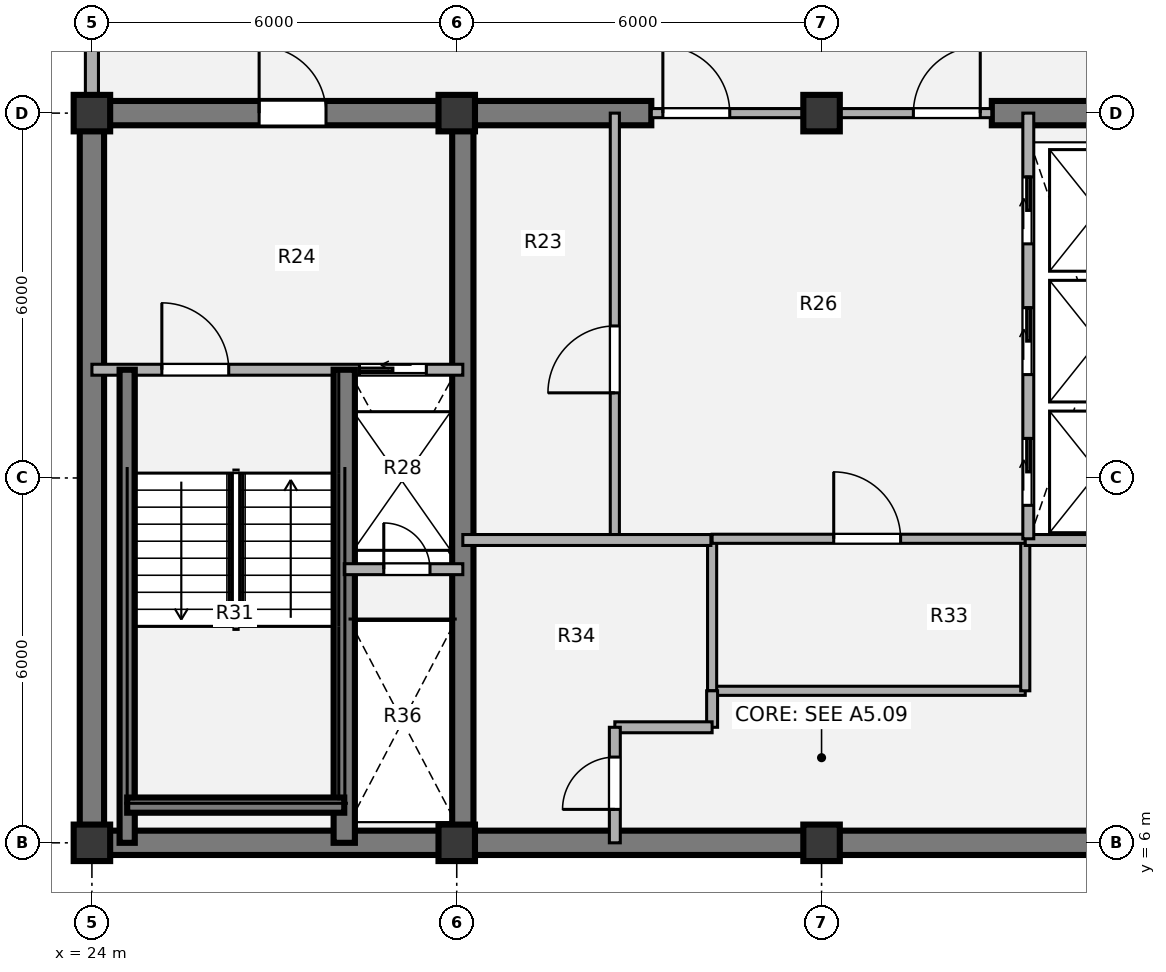
"""IFC4 building model, lengths in metres.
Left out: names, types, materials, properties, quantities, classifications, styles, units other than length and angle.
Written with IfcOpenShell. Run it as: python <this file> out.ifc"""

import sys

from ifc_helpers import new_model, si_unit, direction, frame, frame_2d, origin, origin_2d, place, context, subcontext, project, spatial, rectangle, extrude, source, transform, mapped, element, fill, save


model = new_model("IFC4")
c1 = context("Model", 3, precision=1e-05, world=origin(), true_north=direction((0.0, 1.0)))
c2 = subcontext(c1, "Body", "Model", "MODEL_VIEW")
j1 = project(units=[si_unit("LENGTHUNIT", "METRE"), si_unit("PLANEANGLEUNIT", "RADIAN")], contexts=[c1])
p1 = place(None, origin())
s1 = spatial("IfcSite", under=j1, at=p1, CompositionType="ELEMENT")
p2 = place(p1, origin())
s2 = spatial("IfcBuilding", under=s1, at=p2, CompositionType="ELEMENT")
p3 = place(p2, frame((0.0, 0.0, 275.94)))
s3 = spatial("IfcBuildingStorey", under=s2, at=p3, CompositionType="ELEMENT", Elevation=275.94)
m1 = source(origin(), c2, "Body", "SweptSolid", [
    extrude(rectangle(XDim=0.6, YDim=0.6, at=origin_2d()), origin(), (0.0, 0.0, 1.0), 3.78),
])
for number, where, z_axis, x_axis in (
    (1, (24.0, 6.0, 0.0), (0.0, 0.0, 1.0), (1.0, 0.0, 0.0)),
    (2, (30.0, 6.0, 0.0), (0.0, 0.0, 1.0), (1.0, 0.0, 0.0)),
    (3, (36.0, 6.0, 0.0), (0.0, 0.0, 1.0), (1.0, 0.0, 0.0)),
    (4, (24.0, 18.0, 0.0), (0.0, 0.0, 1.0), (1.0, 0.0, 0.0)),
    (5, (30.0, 18.0, 0.0), (0.0, 0.0, 1.0), (1.0, 0.0, 0.0)),
    (6, (36.0, 18.0, 0.0), (0.0, 0.0, 1.0), (1.0, 0.0, 0.0)),
):
    element("IfcColumn", number, at=place(p3, frame(where, z_axis=z_axis, x_axis=x_axis)), inside=s3, PredefinedType="COLUMN", context=c2, shape_type="MappedRepresentation", body=[
        mapped(m1, transform((0.0, 0.0, 0.0), x_axis=(1.0, 0.0, 0.0), y_axis=(0.0, 1.0, 0.0), z_axis=(0.0, 0.0, 1.0), scale=1.0)),
    ])
p4 = place(p3, frame((48.2, 6.0, 0.0), z_axis=(0.0, 0.0, 1.0), x_axis=(-1.0, 0.0, 0.0)))
e7 = element("IfcWall", 7, at=p4, inside=s3, PredefinedType="SHEAR", context=c2, shape_type="SweptSolid", body=[
    extrude(rectangle(XDim=24.4, YDim=0.4, at=frame_2d((12.2, 0.0))), origin(), (0.0, 0.0, 1.0), 3.78),
])
p5 = place(p3, frame((24.0, 6.0, 0.0), z_axis=(0.0, 0.0, 1.0), x_axis=(0.0, 1.0, 0.0)))
e8 = element("IfcWall", 8, at=p5, inside=s3, PredefinedType="SHEAR", context=c2, shape_type="SweptSolid", body=[
    extrude(rectangle(XDim=12.0, YDim=0.4, at=frame_2d((6.0, 0.0))), origin(), (0.0, 0.0, 1.0), 3.78),
])
p6 = place(p3, frame((23.8, 18.0, 0.0), z_axis=(0.0, 0.0, 1.0), x_axis=(1.0, 0.0, 0.0)))
e9 = element("IfcWall", 9, at=p6, inside=s3, PredefinedType="SHEAR", context=c2, shape_type="SweptSolid", body=[
    extrude(rectangle(XDim=9.4, YDim=0.4, at=frame_2d((4.7, 0.0))), origin(), (0.0, 0.0, 1.0), 3.78),
])
p7 = place(p6, frame((2.95, 0.0, 0.0)))
e10 = element("IfcOpeningElement", 10, at=p7, cuts=e9, PredefinedType="OPENING", context=c2, shape_type="SweptSolid", body=[
    extrude(rectangle(XDim=1.1, YDim=2.1, at=origin_2d()), frame((0.55, 0.21, 1.05), z_axis=(0.0, -1.0, 0.0), x_axis=(1.0, 0.0, 0.0)), (0.0, 0.0, 1.0), 0.42),
])
p8 = place(p3, frame((38.8, 18.0, 0.0), z_axis=(0.0, 0.0, 1.0), x_axis=(1.0, 0.0, 0.0)))
e11 = element("IfcWall", 11, at=p8, inside=s3, PredefinedType="SHEAR", context=c2, shape_type="SweptSolid", body=[
    extrude(rectangle(XDim=9.4, YDim=0.4, at=frame_2d((4.7, 0.0))), origin(), (0.0, 0.0, 1.0), 3.78),
])
p9 = place(p8, frame((5.45, 0.0, 0.0)))
e12 = element("IfcOpeningElement", 12, at=p9, cuts=e11, PredefinedType="OPENING", context=c2, shape_type="SweptSolid", body=[
    extrude(rectangle(XDim=1.1, YDim=2.1, at=origin_2d()), frame((0.55, 0.21, 1.05), z_axis=(0.0, -1.0, 0.0), x_axis=(1.0, 0.0, 0.0)), (0.0, 0.0, 1.0), 0.42),
])
p10 = place(p3, frame((30.1, 6.0, 0.0), z_axis=(0.0, 0.0, 1.0), x_axis=(0.0, 1.0, 0.0)))
e13 = element("IfcWall", 13, at=p10, inside=s3, PredefinedType="SHEAR", context=c2, shape_type="SweptSolid", body=[
    extrude(rectangle(XDim=12.0, YDim=0.35, at=frame_2d((6.0, 0.0))), origin(), (0.0, 0.0, 1.0), 3.78),
])
p11 = place(p3, frame((24.0, 18.28, 0.0), z_axis=(0.0, 0.0, 1.0), x_axis=(0.0, 1.0, 0.0)))
e14 = element("IfcWall", 14, at=p11, inside=s3, PredefinedType="SOLIDWALL", context=c2, shape_type="SweptSolid", body=[
    extrude(rectangle(XDim=2.77, YDim=0.215, at=frame_2d((1.385, 0.0))), origin(), (0.0, 0.0, 1.0), 2.718),
])
p12 = place(p3, frame((32.6, 11.0, 0.0), z_axis=(0.0, 0.0, 1.0), x_axis=(0.0, 1.0, 0.0)))
e15 = element("IfcWall", 15, at=p12, inside=s3, PredefinedType="PARTITIONING", context=c2, shape_type="SweptSolid", body=[
    extrude(rectangle(XDim=7.0, YDim=0.15, at=frame_2d((3.5, 0.0))), origin(), (0.0, 0.0, 1.0), 3.5),
])
p13 = place(p12, frame((2.4, 0.0, 0.0)))
e16 = element("IfcOpeningElement", 16, at=p13, cuts=e15, PredefinedType="OPENING", context=c2, shape_type="SweptSolid", body=[
    extrude(rectangle(XDim=1.1, YDim=2.1, at=origin_2d()), frame((0.55, 0.085, 1.05), z_axis=(0.0, -1.0, 0.0), x_axis=(1.0, 0.0, 0.0)), (0.0, 0.0, 1.0), 0.17),
])
p14 = place(p3, frame((34.2, 8.5, 0.0), z_axis=(0.0, 0.0, 1.0), x_axis=(1.0, 0.0, 0.0)))
e17 = element("IfcWall", 17, at=p14, inside=s3, PredefinedType="PARTITIONING", context=c2, shape_type="SweptSolid", body=[
    extrude(rectangle(XDim=5.15, YDim=0.15, at=frame_2d((2.575, 0.0))), origin(), (0.0, 0.0, 1.0), 3.5),
])
for number, where, z_axis, x_axis in (
    (18, (34.2, 8.5, 0.0), (0.0, 0.0, 1.0), (0.0, 1.0, 0.0)),
    (19, (39.35, 8.5, 0.0), (0.0, 0.0, 1.0), (0.0, 1.0, 0.0)),
):
    element("IfcWall", number, at=place(p3, frame(where, z_axis=z_axis, x_axis=x_axis)), inside=s3, PredefinedType="PARTITIONING", context=c2, shape_type="SweptSolid", body=[
        extrude(rectangle(XDim=2.5, YDim=0.15, at=frame_2d((1.25, 0.0))), origin(), (0.0, 0.0, 1.0), 3.5),
    ])
p15 = place(p3, frame((34.2, 11.0, 0.0), z_axis=(0.0, 0.0, 1.0), x_axis=(1.0, 0.0, 0.0)))
e20 = element("IfcWall", 20, at=p15, inside=s3, PredefinedType="PARTITIONING", context=c2, shape_type="SweptSolid", body=[
    extrude(rectangle(XDim=5.15, YDim=0.15, at=frame_2d((2.575, 0.0))), origin(), (0.0, 0.0, 1.0), 3.5),
])
p16 = place(p15, frame((2.0, 0.0, 0.0)))
e21 = element("IfcOpeningElement", 21, at=p16, cuts=e20, PredefinedType="OPENING", context=c2, shape_type="SweptSolid", body=[
    extrude(rectangle(XDim=1.1, YDim=2.1, at=origin_2d()), frame((0.55, 0.085, 1.05), z_axis=(0.0, -1.0, 0.0), x_axis=(1.0, 0.0, 0.0)), (0.0, 0.0, 1.0), 0.17),
])
p17 = place(p3, frame((30.1, 10.98, 0.0), z_axis=(0.0, 0.0, 1.0), x_axis=(1.0, 0.0, 0.0)))
e22 = element("IfcWall", 22, at=p17, inside=s3, PredefinedType="PARTITIONING", context=c2, shape_type="SweptSolid", body=[
    extrude(rectangle(XDim=4.08, YDim=0.18, at=frame_2d((2.04, 0.0))), origin(), (0.0, 0.0, 1.0), 3.5),
])
p18 = place(p3, frame((34.2, 7.9, 0.0), z_axis=(0.0, 0.0, 1.0), x_axis=(0.0, 1.0, 0.0)))
e23 = element("IfcWall", 23, at=p18, inside=s3, PredefinedType="PARTITIONING", context=c2, shape_type="SweptSolid", body=[
    extrude(rectangle(XDim=0.6, YDim=0.18, at=frame_2d((0.3, 0.0))), origin(), (0.0, 0.0, 1.0), 3.5),
])
p19 = place(p3, frame((32.6, 7.9, 0.0), z_axis=(0.0, 0.0, 1.0), x_axis=(1.0, 0.0, 0.0)))
e24 = element("IfcWall", 24, at=p19, inside=s3, PredefinedType="PARTITIONING", context=c2, shape_type="SweptSolid", body=[
    extrude(rectangle(XDim=1.6, YDim=0.18, at=frame_2d((0.8, 0.0))), origin(), (0.0, 0.0, 1.0), 3.5),
])
p20 = place(p3, frame((32.6, 6.0, 0.0), z_axis=(0.0, 0.0, 1.0), x_axis=(0.0, 1.0, 0.0)))
e25 = element("IfcWall", 25, at=p20, inside=s3, PredefinedType="PARTITIONING", context=c2, shape_type="SweptSolid", body=[
    extrude(rectangle(XDim=1.9, YDim=0.18, at=frame_2d((0.95, 0.0))), origin(), (0.0, 0.0, 1.0), 3.5),
])
p21 = place(p20, frame((0.55, 0.0, 0.0)))
e26 = element("IfcOpeningElement", 26, at=p21, cuts=e25, PredefinedType="OPENING", context=c2, shape_type="SweptSolid", body=[
    extrude(rectangle(XDim=0.86, YDim=2.1, at=origin_2d()), frame((0.43, 0.1, 1.05), z_axis=(0.0, -1.0, 0.0), x_axis=(1.0, 0.0, 0.0)), (0.0, 0.0, 1.0), 0.2),
])
p22 = place(p3, frame((39.35, 10.98, 0.0), z_axis=(0.0, 0.0, 1.0), x_axis=(1.0, 0.0, 0.0)))
e27 = element("IfcWall", 27, at=p22, inside=s3, PredefinedType="PARTITIONING", context=c2, shape_type="SweptSolid", body=[
    extrude(rectangle(XDim=2.55, YDim=0.18, at=frame_2d((1.275, 0.0))), origin(), (0.0, 0.0, 1.0), 3.5),
])
p23 = place(p3, frame((33.2, 18.0, 0.0), z_axis=(0.0, 0.0, 1.0), x_axis=(1.0, 0.0, 0.0)))
e28 = element("IfcWall", 28, at=p23, inside=s3, PredefinedType="PARTITIONING", context=c2, shape_type="SweptSolid", body=[
    extrude(rectangle(XDim=5.6, YDim=0.15, at=frame_2d((2.8, 0.0))), origin(), (0.0, 0.0, 1.0), 2.515),
])
p24 = place(p23, frame((0.19, 0.0, 0.0)))
e29 = element("IfcOpeningElement", 29, at=p24, cuts=e28, PredefinedType="OPENING", context=c2, shape_type="SweptSolid", body=[
    extrude(rectangle(XDim=1.1, YDim=2.1, at=origin_2d()), frame((0.55, 0.085, 1.05), z_axis=(0.0, -1.0, 0.0), x_axis=(1.0, 0.0, 0.0)), (0.0, 0.0, 1.0), 0.17),
])
p25 = place(p23, frame((4.31, 0.0, 0.0)))
e30 = element("IfcOpeningElement", 30, at=p25, cuts=e28, PredefinedType="OPENING", context=c2, shape_type="SweptSolid", body=[
    extrude(rectangle(XDim=1.1, YDim=2.1, at=origin_2d()), frame((0.55, 0.085, 1.05), z_axis=(0.0, -1.0, 0.0), x_axis=(1.0, 0.0, 0.0)), (0.0, 0.0, 1.0), 0.17),
])
p26 = place(p3, frame((24.0, 13.78, 0.0), z_axis=(0.0, 0.0, 1.0), x_axis=(1.0, 0.0, 0.0)))
e31 = element("IfcWall", 31, at=p26, inside=s3, PredefinedType="PARTITIONING", context=c2, shape_type="SweptSolid", body=[
    extrude(rectangle(XDim=6.1, YDim=0.18, at=frame_2d((3.05, 0.0))), origin(), (0.0, 0.0, 1.0), 3.5),
])
p27 = place(p26, frame((1.15, 0.0, 0.0)))
e32 = element("IfcOpeningElement", 32, at=p27, cuts=e31, PredefinedType="OPENING", context=c2, shape_type="SweptSolid", body=[
    extrude(rectangle(XDim=1.1, YDim=2.1, at=origin_2d()), frame((0.55, 0.1, 1.05), z_axis=(0.0, -1.0, 0.0), x_axis=(1.0, 0.0, 0.0)), (0.0, 0.0, 1.0), 0.2),
])
p28 = place(p26, frame((4.4, 0.0, 0.0)))
e33 = element("IfcOpeningElement", 33, at=p28, cuts=e31, PredefinedType="OPENING", context=c2, shape_type="SweptSolid", body=[
    extrude(rectangle(XDim=1.1, YDim=2.1, at=origin_2d()), frame((0.55, 0.1, 1.05), z_axis=(0.0, -1.0, 0.0), x_axis=(1.0, 0.0, 0.0)), (0.0, 0.0, 1.0), 0.2),
])
p29 = place(p3, frame((28.15, 6.0, 0.0), z_axis=(0.0, 0.0, 1.0), x_axis=(0.0, 1.0, 0.0)))
e34 = element("IfcWall", 34, at=p29, inside=s3, PredefinedType="SHEAR", context=c2, shape_type="SweptSolid", body=[
    extrude(rectangle(XDim=7.78, YDim=0.35, at=frame_2d((3.89, 0.0))), origin(), (0.0, 0.0, 1.0), 3.85),
])
p30 = place(p3, frame((24.58, 6.0, 0.0), z_axis=(0.0, 0.0, 1.0), x_axis=(0.0, 1.0, 0.0)))
e35 = element("IfcWall", 35, at=p30, inside=s3, PredefinedType="SHEAR", context=c2, shape_type="SweptSolid", body=[
    extrude(rectangle(XDim=7.78, YDim=0.25, at=frame_2d((3.89, 0.0))), origin(), (0.0, 0.0, 1.0), 3.85),
])
p31 = place(p3, frame((24.58, 6.62, 0.0), z_axis=(0.0, 0.0, 1.0), x_axis=(1.0, 0.0, 0.0)))
e36 = element("IfcWall", 36, at=p31, inside=s3, PredefinedType="SHEAR", context=c2, shape_type="SweptSolid", body=[
    extrude(rectangle(XDim=3.57, YDim=0.25, at=frame_2d((1.785, 0.0))), origin(), (0.0, 0.0, 1.0), 3.85),
])
p32 = place(p3, frame((28.15, 10.5, 0.0), z_axis=(0.0, 0.0, 1.0), x_axis=(1.0, 0.0, 0.0)))
e37 = element("IfcWall", 37, at=p32, inside=s3, PredefinedType="PARTITIONING", context=c2, shape_type="SweptSolid", body=[
    extrude(rectangle(XDim=1.95, YDim=0.18, at=frame_2d((0.975, 0.0))), origin(), (0.0, 0.0, 1.0), 3.5),
])
p33 = place(p32, frame((0.65, 0.0, 0.0)))
e38 = element("IfcOpeningElement", 38, at=p33, cuts=e37, PredefinedType="OPENING", context=c2, shape_type="SweptSolid", body=[
    extrude(rectangle(XDim=0.76, YDim=2.05, at=origin_2d()), frame((0.38, 0.1, 1.025), z_axis=(0.0, -1.0, 0.0), x_axis=(1.0, 0.0, 0.0)), (0.0, 0.0, 1.0), 0.2),
])
p34 = place(p3, frame((39.4, 11.0, 0.0), z_axis=(0.0, 0.0, 1.0), x_axis=(0.0, 1.0, 0.0)))
e39 = element("IfcWall", 39, at=p34, inside=s3, PredefinedType="PARTITIONING", context=c2, shape_type="SweptSolid", body=[
    extrude(rectangle(XDim=7.0, YDim=0.18, at=frame_2d((3.5, 0.0))), origin(), (0.0, 0.0, 1.0), 3.5),
])
p35 = place(p34, frame((0.55, 0.0, 0.0)))
e40 = element("IfcOpeningElement", 40, at=p35, cuts=e39, PredefinedType="OPENING", context=c2, shape_type="SweptSolid", body=[
    extrude(rectangle(XDim=1.1, YDim=2.1, at=origin_2d()), frame((0.55, 0.1, 1.05), z_axis=(0.0, -1.0, 0.0), x_axis=(1.0, 0.0, 0.0)), (0.0, 0.0, 1.0), 0.2),
])
p36 = place(p34, frame((2.7, 0.0, 0.0)))
e41 = element("IfcOpeningElement", 41, at=p36, cuts=e39, PredefinedType="OPENING", context=c2, shape_type="SweptSolid", body=[
    extrude(rectangle(XDim=1.1, YDim=2.1, at=origin_2d()), frame((0.55, 0.1, 1.05), z_axis=(0.0, -1.0, 0.0), x_axis=(1.0, 0.0, 0.0)), (0.0, 0.0, 1.0), 0.2),
])
p37 = place(p34, frame((4.85, 0.0, 0.0)))
e42 = element("IfcOpeningElement", 42, at=p37, cuts=e39, PredefinedType="OPENING", context=c2, shape_type="SweptSolid", body=[
    extrude(rectangle(XDim=1.1, YDim=2.1, at=origin_2d()), frame((0.55, 0.1, 1.05), z_axis=(0.0, -1.0, 0.0), x_axis=(1.0, 0.0, 0.0)), (0.0, 0.0, 1.0), 0.2),
])
m2 = source(origin(), c2, "Body", "SweptSolid", [
    extrude(rectangle(XDim=1.1, YDim=2.1, at=origin_2d()), frame((0.55, 0.025, 1.05), z_axis=(0.0, -1.0, 0.0), x_axis=(1.0, 0.0, 0.0)), (0.0, 0.0, 1.0), 0.05),
])
p38 = place(p13, origin())
e43 = element("IfcDoor", 43, at=p38, inside=s3, OperationType="SINGLE_SWING_LEFT", PredefinedType="DOOR", context=c2, shape_type="MappedRepresentation", body=[
    mapped(m2, transform((0.0, 0.0, 0.0), x_axis=(1.0, 0.0, 0.0), y_axis=(0.0, 1.0, 0.0), z_axis=(0.0, 0.0, 1.0), scale=1.0)),
])
fill(e16, e43)
p39 = place(p16, origin())
e44 = element("IfcDoor", 44, at=p39, inside=s3, OperationType="SINGLE_SWING_LEFT", PredefinedType="DOOR", context=c2, shape_type="MappedRepresentation", body=[
    mapped(m2, transform((0.0, 0.0, 0.0), x_axis=(1.0, 0.0, 0.0), y_axis=(0.0, 1.0, 0.0), z_axis=(0.0, 0.0, 1.0), scale=1.0)),
])
fill(e21, e44)
m3 = source(origin(), c2, "Body", "SweptSolid", [
    extrude(rectangle(XDim=0.86, YDim=2.1, at=origin_2d()), frame((0.43, 0.025, 1.05), z_axis=(0.0, -1.0, 0.0), x_axis=(1.0, 0.0, 0.0)), (0.0, 0.0, 1.0), 0.05),
])
p40 = place(p21, origin())
e45 = element("IfcDoor", 45, at=p40, inside=s3, OperationType="SINGLE_SWING_LEFT", PredefinedType="DOOR", context=c2, shape_type="MappedRepresentation", body=[
    mapped(m3, transform((0.0, 0.0, 0.0), x_axis=(1.0, 0.0, 0.0), y_axis=(0.0, 1.0, 0.0), z_axis=(0.0, 0.0, 1.0), scale=1.0)),
])
fill(e26, e45)
m4 = source(origin(), c2, "Body", "SweptSolid", [
    extrude(rectangle(XDim=1.1, YDim=2.1, at=origin_2d()), frame((0.55, 0.025, 1.05), z_axis=(0.0, -1.0, 0.0), x_axis=(1.0, 0.0, 0.0)), (0.0, 0.0, 1.0), 0.05),
])
p41 = place(p24, origin())
e46 = element("IfcDoor", 46, at=p41, inside=s3, OperationType="SINGLE_SWING_LEFT", PredefinedType="DOOR", context=c2, shape_type="MappedRepresentation", body=[
    mapped(m4, transform((0.0, 0.0, 0.0), x_axis=(1.0, 0.0, 0.0), y_axis=(0.0, 1.0, 0.0), z_axis=(0.0, 0.0, 1.0), scale=1.0)),
])
fill(e29, e46)
p42 = place(p25, origin())
e47 = element("IfcDoor", 47, at=p42, inside=s3, OperationType="SINGLE_SWING_RIGHT", PredefinedType="DOOR", context=c2, shape_type="MappedRepresentation", body=[
    mapped(m4, transform((0.0, 0.0, 0.0), x_axis=(1.0, 0.0, 0.0), y_axis=(0.0, 1.0, 0.0), z_axis=(0.0, 0.0, 1.0), scale=1.0)),
])
fill(e30, e47)
m5 = source(origin(), c2, "Body", "SweptSolid", [
    extrude(rectangle(XDim=1.1, YDim=2.1, at=origin_2d()), frame((0.55, 0.025, 1.05), z_axis=(0.0, -1.0, 0.0), x_axis=(1.0, 0.0, 0.0)), (0.0, 0.0, 1.0), 0.05),
])
p43 = place(p27, origin())
e48 = element("IfcDoor", 48, at=p43, inside=s3, OperationType="SINGLE_SWING_LEFT", PredefinedType="DOOR", context=c2, shape_type="MappedRepresentation", body=[
    mapped(m5, transform((0.0, 0.0, 0.0), x_axis=(1.0, 0.0, 0.0), y_axis=(0.0, 1.0, 0.0), z_axis=(0.0, 0.0, 1.0), scale=1.0)),
])
fill(e32, e48)
m6 = source(origin(), c2, "Body", "SweptSolid", [
    extrude(rectangle(XDim=1.1, YDim=2.1, at=origin_2d()), frame((0.55, 0.025, 1.05), z_axis=(0.0, -1.0, 0.0), x_axis=(1.0, 0.0, 0.0)), (0.0, 0.0, 1.0), 0.05),
])
p44 = place(p28, origin())
e49 = element("IfcDoor", 49, at=p44, inside=s3, OperationType="SLIDING_TO_LEFT", PredefinedType="DOOR", context=c2, shape_type="MappedRepresentation", body=[
    mapped(m6, transform((0.0, 0.0, 0.0), x_axis=(1.0, 0.0, 0.0), y_axis=(0.0, 1.0, 0.0), z_axis=(0.0, 0.0, 1.0), scale=1.0)),
])
fill(e33, e49)
m7 = source(origin(), c2, "Body", "SweptSolid", [
    extrude(rectangle(XDim=0.76, YDim=2.05, at=origin_2d()), frame((0.38, 0.025, 1.025), z_axis=(0.0, -1.0, 0.0), x_axis=(1.0, 0.0, 0.0)), (0.0, 0.0, 1.0), 0.05),
])
p45 = place(p33, origin())
e50 = element("IfcDoor", 50, at=p45, inside=s3, OperationType="SINGLE_SWING_LEFT", PredefinedType="DOOR", context=c2, shape_type="MappedRepresentation", body=[
    mapped(m7, transform((0.0, 0.0, 0.0), x_axis=(1.0, 0.0, 0.0), y_axis=(0.0, 1.0, 0.0), z_axis=(0.0, 0.0, 1.0), scale=1.0)),
])
fill(e38, e50)
p46 = place(p7, origin())
e51 = element("IfcDoor", 51, at=p46, inside=s3, OperationType="SINGLE_SWING_LEFT", PredefinedType="DOOR", context=c2, shape_type="MappedRepresentation", body=[
    mapped(m4, transform((0.0, 0.0, 0.0), x_axis=(1.0, 0.0, 0.0), y_axis=(0.0, 1.0, 0.0), z_axis=(0.0, 0.0, 1.0), scale=1.0)),
])
fill(e10, e51)
p47 = place(p35, origin())
e52 = element("IfcDoor", 52, at=p47, inside=s3, OperationType="SLIDING_TO_RIGHT", PredefinedType="DOOR", context=c2, shape_type="MappedRepresentation", body=[
    mapped(m6, transform((0.0, 0.0, 0.0), x_axis=(1.0, 0.0, 0.0), y_axis=(0.0, 1.0, 0.0), z_axis=(0.0, 0.0, 1.0), scale=1.0)),
])
fill(e40, e52)
p48 = place(p36, origin())
e53 = element("IfcDoor", 53, at=p48, inside=s3, OperationType="SLIDING_TO_RIGHT", PredefinedType="DOOR", context=c2, shape_type="MappedRepresentation", body=[
    mapped(m6, transform((0.0, 0.0, 0.0), x_axis=(1.0, 0.0, 0.0), y_axis=(0.0, 1.0, 0.0), z_axis=(0.0, 0.0, 1.0), scale=1.0)),
])
fill(e41, e53)
p49 = place(p37, origin())
e54 = element("IfcDoor", 54, at=p49, inside=s3, OperationType="SLIDING_TO_RIGHT", PredefinedType="DOOR", context=c2, shape_type="MappedRepresentation", body=[
    mapped(m6, transform((0.0, 0.0, 0.0), x_axis=(1.0, 0.0, 0.0), y_axis=(0.0, 1.0, 0.0), z_axis=(0.0, 0.0, 1.0), scale=1.0)),
])
fill(e42, e54)
save(model, sys.argv[1])
